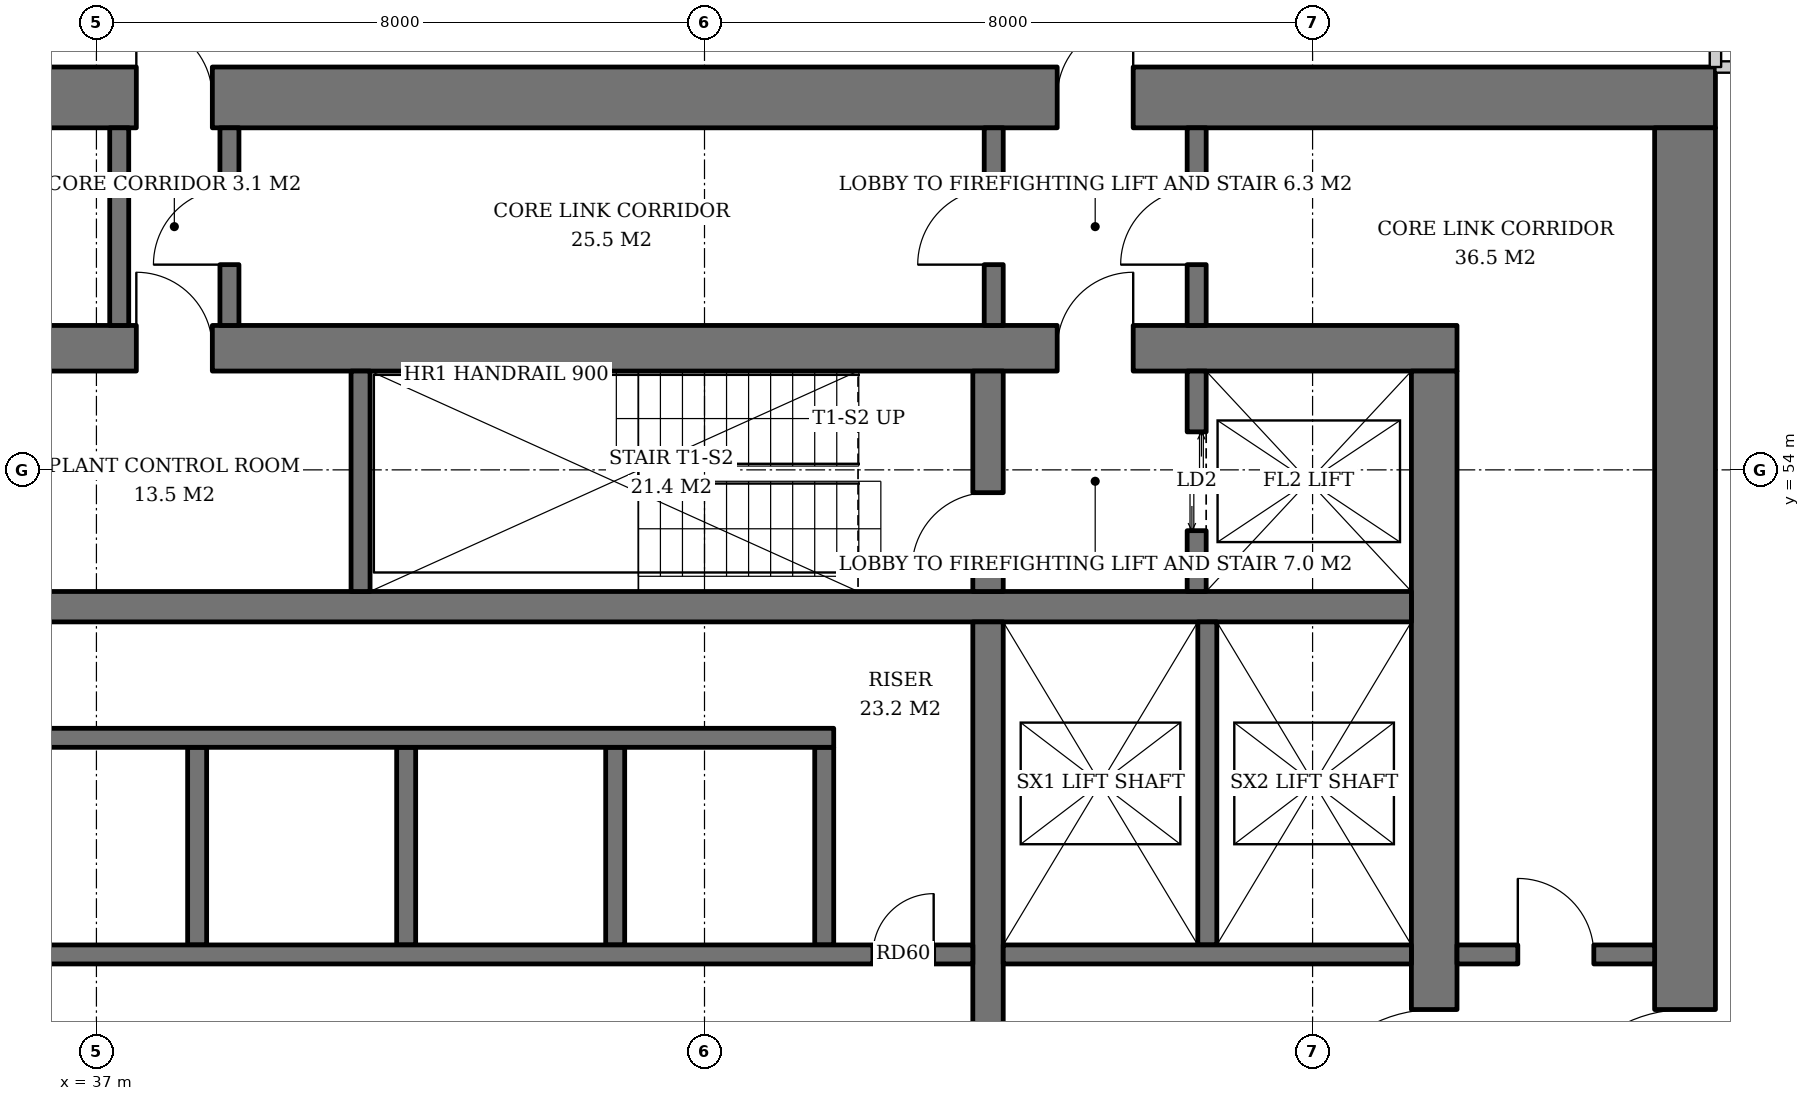
"""IFC4 building model, lengths in metres.
Left out: names, types, materials, properties, quantities, classifications, styles, units other than length and angle.
Written with IfcOpenShell. Run it as: python <this file> out.ifc"""

import sys

from ifc_helpers import new_model, si_unit, direction, frame, frame_2d, origin, place, context, subcontext, project, spatial, rectangle, extrude, element, fill, save


model = new_model("IFC4")
c1 = context("Model", 3, precision=1e-05, world=origin(), true_north=direction((0.0, 1.0)))
c2 = subcontext(c1, "Body", "Model", "MODEL_VIEW")
j1 = project(units=[si_unit("LENGTHUNIT", "METRE"), si_unit("PLANEANGLEUNIT", "RADIAN")], contexts=[c1])
p1 = place(None, origin())
s1 = spatial("IfcSite", under=j1, at=p1, CompositionType="ELEMENT")
p2 = place(p1, origin())
s2 = spatial("IfcBuilding", under=s1, at=p2, CompositionType="ELEMENT")
p3 = place(p2, frame((0.0, 0.0, 85.6)))
s3 = spatial("IfcBuildingStorey", under=s2, at=p3, CompositionType="ELEMENT", Elevation=85.6)
p4 = place(p3, frame((35.1, 55.6, 0.0), z_axis=(0.0, 0.0, 1.0), x_axis=(1.0, 0.0, 0.0)))
e1 = element("IfcWall", 1, at=p4, inside=s3, PredefinedType="SHEAR", context=c2, shape_type="SweptSolid", body=[
    extrude(rectangle(XDim=19.8, YDim=0.6, at=frame_2d((9.9, 0.0))), origin(), (0.0, 0.0, 1.0), 3.8),
])
p5 = place(p4, frame((14.54, 0.0, 0.0)))
e2 = element("IfcOpeningElement", 2, at=p5, cuts=e1, PredefinedType="OPENING", context=c2, shape_type="SweptSolid", body=[
    extrude(rectangle(XDim=1.0, YDim=2.1, at=frame_2d((0.5, 1.05))), frame((0.0, 0.31, 0.0), z_axis=(0.0, -1.0, 0.0), x_axis=(1.0, 0.0, 0.0)), (0.0, 0.0, 1.0), 0.62),
])
p6 = place(p4, frame((2.425, 0.0, 0.0)))
e3 = element("IfcOpeningElement", 3, at=p6, cuts=e1, PredefinedType="OPENING", context=c2, shape_type="SweptSolid", body=[
    extrude(rectangle(XDim=1.0, YDim=2.1, at=frame_2d((0.5, 1.05))), frame((0.0, 0.31, 0.0), z_axis=(0.0, -1.0, 0.0), x_axis=(1.0, 0.0, 0.0)), (0.0, 0.0, 1.0), 0.62),
])
p7 = place(p3, frame((54.6, 36.7, 0.0), z_axis=(0.0, 0.0, 1.0), x_axis=(0.0, 1.0, 0.0)))
e4 = element("IfcWall", 4, at=p7, inside=s3, PredefinedType="SHEAR", context=c2, shape_type="SweptSolid", body=[
    extrude(rectangle(XDim=18.6, YDim=0.6, at=frame_2d((9.3, 0.0))), origin(), (0.0, 0.0, 1.0), 3.8),
])
p8 = place(p7, frame((8.4, 0.0, 0.0)))
e5 = element("IfcOpeningElement", 5, at=p8, cuts=e4, PredefinedType="OPENING", context=c2, shape_type="SweptSolid", body=[
    extrude(rectangle(XDim=1.8, YDim=2.4, at=frame_2d((0.9, 1.2))), frame((0.0, 0.31, 0.0), z_axis=(0.0, -1.0, 0.0), x_axis=(1.0, 0.0, 0.0)), (0.0, 0.0, 1.0), 0.62),
])
p9 = place(p3, frame((31.7, 58.9, 0.0), z_axis=(0.0, 0.0, 1.0), x_axis=(1.0, 0.0, 0.0)))
e6 = element("IfcWall", 6, at=p9, inside=s3, PredefinedType="SHEAR", context=c2, shape_type="SweptSolid", body=[
    extrude(rectangle(XDim=26.6, YDim=0.8, at=frame_2d((13.3, 0.0))), origin(), (0.0, 0.0, 1.0), 3.8),
])
p10 = place(p9, frame((17.94, 0.0, 0.0)))
e7 = element("IfcOpeningElement", 7, at=p10, cuts=e6, PredefinedType="OPENING", context=c2, shape_type="SweptSolid", body=[
    extrude(rectangle(XDim=1.0, YDim=2.1, at=frame_2d((0.5, 1.05))), frame((0.0, 0.41, 0.0), z_axis=(0.0, -1.0, 0.0), x_axis=(1.0, 0.0, 0.0)), (0.0, 0.0, 1.0), 0.82),
])
p11 = place(p9, frame((5.825, 0.0, 0.0)))
e8 = element("IfcOpeningElement", 8, at=p11, cuts=e6, PredefinedType="OPENING", context=c2, shape_type="SweptSolid", body=[
    extrude(rectangle(XDim=1.0, YDim=2.1, at=frame_2d((0.5, 1.05))), frame((0.0, 0.41, 0.0), z_axis=(0.0, -1.0, 0.0), x_axis=(1.0, 0.0, 0.0)), (0.0, 0.0, 1.0), 0.82),
])
p12 = place(p9, frame((2.637, 0.0, 0.0)))
e9 = element("IfcOpeningElement", 9, at=p12, cuts=e6, PredefinedType="OPENING", context=c2, shape_type="SweptSolid", body=[
    extrude(rectangle(XDim=1.0, YDim=2.1, at=frame_2d((0.5, 1.05))), frame((0.0, 0.41, 0.0), z_axis=(0.0, -1.0, 0.0), x_axis=(1.0, 0.0, 0.0)), (0.0, 0.0, 1.0), 0.82),
])
p13 = place(p3, frame((57.9, 33.5, 0.0), z_axis=(0.0, 0.0, 1.0), x_axis=(0.0, 1.0, 0.0)))
e10 = element("IfcWall", 10, at=p13, inside=s3, PredefinedType="SHEAR", context=c2, shape_type="SweptSolid", body=[
    extrude(rectangle(XDim=25.0, YDim=0.8, at=frame_2d((12.5, 0.0))), origin(), (0.0, 0.0, 1.0), 3.8),
])
p14 = place(p13, frame((11.6, 0.0, 0.0)))
e11 = element("IfcOpeningElement", 11, at=p14, cuts=e10, PredefinedType="OPENING", context=c2, shape_type="SweptSolid", body=[
    extrude(rectangle(XDim=1.8, YDim=2.4, at=frame_2d((0.9, 1.2))), frame((0.0, 0.41, 0.0), z_axis=(0.0, -1.0, 0.0), x_axis=(1.0, 0.0, 0.0)), (0.0, 0.0, 1.0), 0.82),
])
p15 = place(p3, frame((35.7, 52.2, 0.0), z_axis=(0.0, 0.0, 1.0), x_axis=(1.0, 0.0, 0.0)))
e12 = element("IfcWall", 12, at=p15, inside=s3, PredefinedType="SHEAR", context=c2, shape_type="SweptSolid", body=[
    extrude(rectangle(XDim=18.6, YDim=0.4, at=frame_2d((9.3, 0.0))), origin(), (0.0, 0.0, 1.0), 3.8),
])
p16 = place(p3, frame((48.73, 40.0, 0.0), z_axis=(0.0, 0.0, 1.0), x_axis=(0.0, 1.0, 0.0)))
e13 = element("IfcWall", 13, at=p16, inside=s3, PredefinedType="SHEAR", context=c2, shape_type="SweptSolid", body=[
    extrude(rectangle(XDim=12.0, YDim=0.4, at=frame_2d((6.0, 0.0))), origin(), (0.0, 0.0, 1.0), 3.8),
])
p17 = place(p16, frame((5.5, 0.0, 0.0)))
e14 = element("IfcOpeningElement", 14, at=p17, cuts=e13, PredefinedType="OPENING", context=c2, shape_type="SweptSolid", body=[
    extrude(rectangle(XDim=1.0, YDim=2.1, at=frame_2d((0.5, 1.05))), frame((0.0, 0.21, 0.0), z_axis=(0.0, -1.0, 0.0), x_axis=(1.0, 0.0, 0.0)), (0.0, 0.0, 1.0), 0.42),
])
p18 = place(p3, frame((48.73, 52.4, 0.0), z_axis=(0.0, 0.0, 1.0), x_axis=(0.0, 1.0, 0.0)))
e15 = element("IfcWall", 15, at=p18, inside=s3, PredefinedType="SHEAR", context=c2, shape_type="SweptSolid", body=[
    extrude(rectangle(XDim=2.9, YDim=0.4, at=frame_2d((1.45, 0.0))), origin(), (0.0, 0.0, 1.0), 3.8),
])
p19 = place(p18, frame((0.3, 0.0, 0.0)))
e16 = element("IfcOpeningElement", 16, at=p19, cuts=e15, PredefinedType="OPENING", context=c2, shape_type="SweptSolid", body=[
    extrude(rectangle(XDim=1.0, YDim=2.1, at=frame_2d((0.5, 1.05))), frame((0.0, 0.21, 0.0), z_axis=(0.0, -1.0, 0.0), x_axis=(1.0, 0.0, 0.0)), (0.0, 0.0, 1.0), 0.42),
])
p20 = place(p3, frame((40.475, 52.4, 0.0), z_axis=(0.0, 0.0, 1.0), x_axis=(0.0, 1.0, 0.0)))
e17 = element("IfcWall", 17, at=p20, inside=s3, PredefinedType="SHEAR", context=c2, shape_type="SweptSolid", body=[
    extrude(rectangle(XDim=2.9, YDim=0.25, at=frame_2d((1.45, 0.0))), origin(), (0.0, 0.0, 1.0), 3.8),
])
p21 = place(p3, frame((51.475, 52.4, 0.0), z_axis=(0.0, 0.0, 1.0), x_axis=(0.0, 1.0, 0.0)))
e18 = element("IfcWall", 18, at=p21, inside=s3, PredefinedType="SHEAR", context=c2, shape_type="SweptSolid", body=[
    extrude(rectangle(XDim=2.9, YDim=0.25, at=frame_2d((1.45, 0.0))), origin(), (0.0, 0.0, 1.0), 3.8),
])
p22 = place(p21, frame((0.8, 0.0, 0.0)))
e19 = element("IfcOpeningElement", 19, at=p22, cuts=e18, PredefinedType="OPENING", context=c2, shape_type="SweptSolid", body=[
    extrude(rectangle(XDim=1.3, YDim=2.2, at=frame_2d((0.65, 1.1))), frame((0.0, 0.135, 0.0), z_axis=(0.0, -1.0, 0.0), x_axis=(1.0, 0.0, 0.0)), (0.0, 0.0, 1.0), 0.27),
])
for number, where, z_axis, x_axis in (
    (20, (38.325, 47.75, 0.0), (0.0, 0.0, 1.0), (0.0, 1.0, 0.0)),
    (21, (41.075, 47.75, 0.0), (0.0, 0.0, 1.0), (0.0, 1.0, 0.0)),
    (22, (43.825, 47.75, 0.0), (0.0, 0.0, 1.0), (0.0, 1.0, 0.0)),
    (23, (46.575, 47.75, 0.0), (0.0, 0.0, 1.0), (0.0, 1.0, 0.0)),
):
    element("IfcWall", number, at=place(p3, frame(where, z_axis=z_axis, x_axis=x_axis)), inside=s3, PredefinedType="SHEAR", context=c2, shape_type="SweptSolid", body=[
        extrude(rectangle(XDim=2.6, YDim=0.25, at=frame_2d((1.3, 0.0))), origin(), (0.0, 0.0, 1.0), 3.8),
    ])
p23 = place(p3, frame((35.7, 50.475, 0.0), z_axis=(0.0, 0.0, 1.0), x_axis=(1.0, 0.0, 0.0)))
e24 = element("IfcWall", 24, at=p23, inside=s3, PredefinedType="SHEAR", context=c2, shape_type="SweptSolid", body=[
    extrude(rectangle(XDim=11.0, YDim=0.25, at=frame_2d((5.5, 0.0))), origin(), (0.0, 0.0, 1.0), 3.8),
])
p24 = place(p3, frame((35.7, 47.625, 0.0), z_axis=(0.0, 0.0, 1.0), x_axis=(1.0, 0.0, 0.0)))
e25 = element("IfcWall", 25, at=p24, inside=s3, PredefinedType="SHEAR", context=c2, shape_type="SweptSolid", body=[
    extrude(rectangle(XDim=12.83, YDim=0.25, at=frame_2d((6.415, 0.0))), origin(), (0.0, 0.0, 1.0), 3.8),
])
p25 = place(p24, frame((11.515, 0.0, 0.0)))
e26 = element("IfcOpeningElement", 26, at=p25, cuts=e25, PredefinedType="OPENING", context=c2, shape_type="SweptSolid", body=[
    extrude(rectangle(XDim=0.8, YDim=2.0, at=frame_2d((0.4, 1.0))), frame((0.0, 0.135, 0.0), z_axis=(0.0, -1.0, 0.0), x_axis=(1.0, 0.0, 0.0)), (0.0, 0.0, 1.0), 0.27),
])
p26 = place(p3, frame((51.615, 47.75, 0.0), z_axis=(0.0, 0.0, 1.0), x_axis=(0.0, 1.0, 0.0)))
e27 = element("IfcWall", 27, at=p26, inside=s3, PredefinedType="SHEAR", context=c2, shape_type="SweptSolid", body=[
    extrude(rectangle(XDim=4.25, YDim=0.25, at=frame_2d((2.125, 0.0))), origin(), (0.0, 0.0, 1.0), 3.8),
])
p27 = place(p3, frame((48.93, 47.625, 0.0), z_axis=(0.0, 0.0, 1.0), x_axis=(1.0, 0.0, 0.0)))
e28 = element("IfcWall", 28, at=p27, inside=s3, PredefinedType="SHEAR", context=c2, shape_type="SweptSolid", body=[
    extrude(rectangle(XDim=5.37, YDim=0.25, at=frame_2d((2.685, 0.0))), origin(), (0.0, 0.0, 1.0), 3.8),
])
p28 = place(p3, frame((48.805, 55.9, 0.0), z_axis=(0.0, 0.0, 1.0), x_axis=(0.0, 1.0, 0.0)))
e29 = element("IfcWall", 29, at=p28, inside=s3, PredefinedType="SOLIDWALL", context=c2, shape_type="SweptSolid", body=[
    extrude(rectangle(XDim=2.6, YDim=0.25, at=frame_2d((1.3, 0.0))), origin(), (0.0, 0.0, 1.0), 3.6),
])
p29 = place(p28, frame((0.8, 0.0, 0.0)))
e30 = element("IfcOpeningElement", 30, at=p29, cuts=e29, PredefinedType="OPENING", context=c2, shape_type="SweptSolid", body=[
    extrude(rectangle(XDim=1.0, YDim=2.1, at=frame_2d((0.5, 1.05))), frame((0.0, 0.135, 0.0), z_axis=(0.0, -1.0, 0.0), x_axis=(1.0, 0.0, 0.0)), (0.0, 0.0, 1.0), 0.27),
])
p30 = place(p3, frame((51.475, 55.9, 0.0), z_axis=(0.0, 0.0, 1.0), x_axis=(0.0, 1.0, 0.0)))
e31 = element("IfcWall", 31, at=p30, inside=s3, PredefinedType="SOLIDWALL", context=c2, shape_type="SweptSolid", body=[
    extrude(rectangle(XDim=2.6, YDim=0.25, at=frame_2d((1.3, 0.0))), origin(), (0.0, 0.0, 1.0), 3.6),
])
p31 = place(p30, frame((0.8, 0.0, 0.0)))
e32 = element("IfcOpeningElement", 32, at=p31, cuts=e31, PredefinedType="OPENING", context=c2, shape_type="SweptSolid", body=[
    extrude(rectangle(XDim=1.0, YDim=2.1, at=frame_2d((0.5, 1.05))), frame((0.0, 0.135, 0.0), z_axis=(0.0, -1.0, 0.0), x_axis=(1.0, 0.0, 0.0)), (0.0, 0.0, 1.0), 0.27),
])
p32 = place(p3, frame((54.9, 47.625, 0.0), z_axis=(0.0, 0.0, 1.0), x_axis=(1.0, 0.0, 0.0)))
e33 = element("IfcWall", 33, at=p32, inside=s3, PredefinedType="SOLIDWALL", context=c2, shape_type="SweptSolid", body=[
    extrude(rectangle(XDim=2.6, YDim=0.25, at=frame_2d((1.3, 0.0))), origin(), (0.0, 0.0, 1.0), 3.6),
])
p33 = place(p32, frame((0.8, 0.0, 0.0)))
e34 = element("IfcOpeningElement", 34, at=p33, cuts=e33, PredefinedType="OPENING", context=c2, shape_type="SweptSolid", body=[
    extrude(rectangle(XDim=1.0, YDim=2.1, at=frame_2d((0.5, 1.05))), frame((0.0, 0.135, 0.0), z_axis=(0.0, -1.0, 0.0), x_axis=(1.0, 0.0, 0.0)), (0.0, 0.0, 1.0), 0.27),
])
p34 = place(p3, frame((37.3, 55.9, 0.0), z_axis=(0.0, 0.0, 1.0), x_axis=(0.0, 1.0, 0.0)))
e35 = element("IfcWall", 35, at=p34, inside=s3, PredefinedType="SOLIDWALL", context=c2, shape_type="SweptSolid", body=[
    extrude(rectangle(XDim=2.6, YDim=0.25, at=frame_2d((1.3, 0.0))), origin(), (0.0, 0.0, 1.0), 3.6),
])
p35 = place(p3, frame((38.75, 55.9, 0.0), z_axis=(0.0, 0.0, 1.0), x_axis=(0.0, 1.0, 0.0)))
e36 = element("IfcWall", 36, at=p35, inside=s3, PredefinedType="SOLIDWALL", context=c2, shape_type="SweptSolid", body=[
    extrude(rectangle(XDim=2.6, YDim=0.25, at=frame_2d((1.3, 0.0))), origin(), (0.0, 0.0, 1.0), 3.6),
])
p36 = place(p35, frame((0.8, 0.0, 0.0)))
e37 = element("IfcOpeningElement", 37, at=p36, cuts=e36, PredefinedType="OPENING", context=c2, shape_type="SweptSolid", body=[
    extrude(rectangle(XDim=1.0, YDim=2.1, at=frame_2d((0.5, 1.05))), frame((0.0, 0.135, 0.0), z_axis=(0.0, -1.0, 0.0), x_axis=(1.0, 0.0, 0.0)), (0.0, 0.0, 1.0), 0.27),
])
p37 = place(p3, frame((58.3, 59.3, 0.0), z_axis=(0.0, 0.0, 1.0), x_axis=(1.0, 0.0, 0.0)))
e38 = element("IfcWall", 38, at=p37, inside=s3, PredefinedType="PARTITIONING", context=c2, shape_type="SweptSolid", body=[
    extrude(rectangle(XDim=2.0, YDim=0.15, at=frame_2d((1.0, 0.0))), origin(), (0.0, 0.0, 1.0), 3.6),
])
p38 = place(p3, frame((58.3, 59.3, 0.0), z_axis=(0.0, 0.0, 1.0), x_axis=(0.0, 1.0, 0.0)))
e39 = element("IfcWall", 39, at=p38, inside=s3, PredefinedType="PARTITIONING", context=c2, shape_type="SweptSolid", body=[
    extrude(rectangle(XDim=2.0, YDim=0.15, at=frame_2d((1.0, 0.0))), origin(), (0.0, 0.0, 1.0), 2.592),
])
p39 = place(p22, origin())
e40 = element("IfcDoor", 40, at=p39, inside=s3, OperationType="DOUBLE_DOOR_SLIDING", PredefinedType="DOOR", context=c2, shape_type="SweptSolid", body=[
    extrude(rectangle(XDim=1.3, YDim=2.2, at=frame_2d((0.65, 1.1))), frame((0.0, 0.025, 0.0), z_axis=(0.0, -1.0, 0.0), x_axis=(1.0, 0.0, 0.0)), (0.0, 0.0, 1.0), 0.05),
])
fill(e19, e40)
p40 = place(p25, origin())
e41 = element("IfcDoor", 41, at=p40, inside=s3, OperationType="SINGLE_SWING_RIGHT", PredefinedType="DOOR", context=c2, shape_type="SweptSolid", body=[
    extrude(rectangle(XDim=0.8, YDim=2.0, at=frame_2d((0.4, 1.0))), frame((0.0, 0.025, 0.0), z_axis=(0.0, -1.0, 0.0), x_axis=(1.0, 0.0, 0.0)), (0.0, 0.0, 1.0), 0.05),
])
fill(e26, e41)
p41 = place(p29, origin())
e42 = element("IfcDoor", 42, at=p41, inside=s3, OperationType="SINGLE_SWING_LEFT", PredefinedType="DOOR", context=c2, shape_type="SweptSolid", body=[
    extrude(rectangle(XDim=1.0, YDim=2.1, at=frame_2d((0.5, 1.05))), frame((0.0, 0.025, 0.0), z_axis=(0.0, -1.0, 0.0), x_axis=(1.0, 0.0, 0.0)), (0.0, 0.0, 1.0), 0.05),
])
fill(e30, e42)
p42 = place(p31, origin())
e43 = element("IfcDoor", 43, at=p42, inside=s3, OperationType="SINGLE_SWING_LEFT", PredefinedType="DOOR", context=c2, shape_type="SweptSolid", body=[
    extrude(rectangle(XDim=1.0, YDim=2.1, at=frame_2d((0.5, 1.05))), frame((0.0, 0.025, 0.0), z_axis=(0.0, -1.0, 0.0), x_axis=(1.0, 0.0, 0.0)), (0.0, 0.0, 1.0), 0.05),
])
fill(e32, e43)
p43 = place(p33, origin())
e44 = element("IfcDoor", 44, at=p43, inside=s3, OperationType="SINGLE_SWING_LEFT", PredefinedType="DOOR", context=c2, shape_type="SweptSolid", body=[
    extrude(rectangle(XDim=1.0, YDim=2.1, at=frame_2d((0.5, 1.05))), frame((0.0, 0.025, 0.0), z_axis=(0.0, -1.0, 0.0), x_axis=(1.0, 0.0, 0.0)), (0.0, 0.0, 1.0), 0.05),
])
fill(e34, e44)
p44 = place(p36, origin())
e45 = element("IfcDoor", 45, at=p44, inside=s3, OperationType="SINGLE_SWING_LEFT", PredefinedType="DOOR", context=c2, shape_type="SweptSolid", body=[
    extrude(rectangle(XDim=1.0, YDim=2.1, at=frame_2d((0.5, 1.05))), frame((0.0, 0.025, 0.0), z_axis=(0.0, -1.0, 0.0), x_axis=(1.0, 0.0, 0.0)), (0.0, 0.0, 1.0), 0.05),
])
fill(e37, e45)
p45 = place(p19, origin())
e46 = element("IfcDoor", 46, at=p45, inside=s3, OperationType="SINGLE_SWING_LEFT", PredefinedType="DOOR", context=c2, shape_type="SweptSolid", body=[
    extrude(rectangle(XDim=1.0, YDim=2.1, at=frame_2d((0.5, 1.05))), frame((0.0, 0.025, 0.0), z_axis=(0.0, -1.0, 0.0), x_axis=(1.0, 0.0, 0.0)), (0.0, 0.0, 1.0), 0.05),
])
fill(e16, e46)
p46 = place(p5, origin())
e47 = element("IfcDoor", 47, at=p46, inside=s3, OperationType="SINGLE_SWING_RIGHT", PredefinedType="DOOR", context=c2, shape_type="SweptSolid", body=[
    extrude(rectangle(XDim=1.0, YDim=2.1, at=frame_2d((0.5, 1.05))), frame((0.0, 0.025, 0.0), z_axis=(0.0, -1.0, 0.0), x_axis=(1.0, 0.0, 0.0)), (0.0, 0.0, 1.0), 0.05),
])
fill(e2, e47)
p47 = place(p8, origin())
e48 = element("IfcDoor", 48, at=p47, inside=s3, OperationType="DOUBLE_DOOR_SINGLE_SWING", PredefinedType="DOOR", context=c2, shape_type="SweptSolid", body=[
    extrude(rectangle(XDim=1.8, YDim=2.4, at=frame_2d((0.9, 1.2))), frame((0.0, 0.025, 0.0), z_axis=(0.0, -1.0, 0.0), x_axis=(1.0, 0.0, 0.0)), (0.0, 0.0, 1.0), 0.05),
])
fill(e5, e48)
p48 = place(p14, origin())
e49 = element("IfcDoor", 49, at=p48, inside=s3, OperationType="DOUBLE_DOOR_SINGLE_SWING", PredefinedType="DOOR", context=c2, shape_type="SweptSolid", body=[
    extrude(rectangle(XDim=1.8, YDim=2.4, at=frame_2d((0.9, 1.2))), frame((0.0, 0.025, 0.0), z_axis=(0.0, -1.0, 0.0), x_axis=(1.0, 0.0, 0.0)), (0.0, 0.0, 1.0), 0.05),
])
fill(e11, e49)
p49 = place(p10, origin())
e50 = element("IfcDoor", 50, at=p49, inside=s3, OperationType="SINGLE_SWING_RIGHT", PredefinedType="DOOR", context=c2, shape_type="SweptSolid", body=[
    extrude(rectangle(XDim=1.0, YDim=2.1, at=frame_2d((0.5, 1.05))), frame((0.0, 0.025, 0.0), z_axis=(0.0, -1.0, 0.0), x_axis=(1.0, 0.0, 0.0)), (0.0, 0.0, 1.0), 0.05),
])
fill(e7, e50)
p50 = place(p11, origin())
e51 = element("IfcDoor", 51, at=p50, inside=s3, OperationType="SINGLE_SWING_LEFT", PredefinedType="DOOR", context=c2, shape_type="SweptSolid", body=[
    extrude(rectangle(XDim=1.0, YDim=2.1, at=frame_2d((0.5, 1.05))), frame((0.0, 0.025, 0.0), z_axis=(0.0, -1.0, 0.0), x_axis=(1.0, 0.0, 0.0)), (0.0, 0.0, 1.0), 0.05),
])
fill(e8, e51)
p51 = place(p6, origin())
e52 = element("IfcDoor", 52, at=p51, inside=s3, OperationType="SINGLE_SWING_LEFT", PredefinedType="DOOR", context=c2, shape_type="SweptSolid", body=[
    extrude(rectangle(XDim=1.0, YDim=2.1, at=frame_2d((0.5, 1.05))), frame((0.0, -0.24, 0.0), z_axis=(0.0, -1.0, 0.0), x_axis=(1.0, 0.0, 0.0)), (0.0, 0.0, 1.0), 0.05),
])
fill(e3, e52)
save(model, sys.argv[1])
